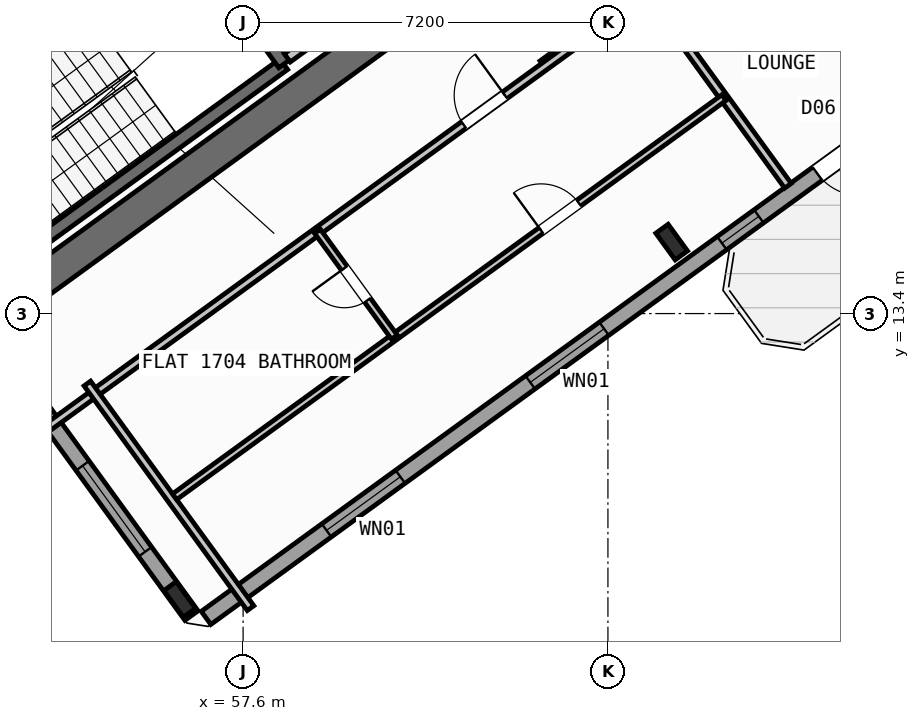
"""IFC4 building model, lengths in metres.
Left out: names, types, materials, properties, quantities, classifications, styles, units other than length and angle.
Written with IfcOpenShell. Run it as: python <this file> out.ifc"""

import sys

from ifc_helpers import new_model, si_unit, direction, frame, frame_2d, origin, origin_2d, place, context, subcontext, project, spatial, rectangle, i_section, extrude, source, transform, mapped, element, fill, save


model = new_model("IFC4")
c1 = context("Model", 3, precision=1e-05, world=origin(), true_north=direction((0.0, 1.0)))
c2 = subcontext(c1, "Body", "Model", "MODEL_VIEW")
j1 = project(units=[si_unit("LENGTHUNIT", "METRE"), si_unit("PLANEANGLEUNIT", "RADIAN")], contexts=[c1])
p1 = place(None, origin())
s1 = spatial("IfcSite", under=j1, at=p1, CompositionType="ELEMENT")
p2 = place(p1, origin())
s2 = spatial("IfcBuilding", under=s1, at=p2, CompositionType="ELEMENT")
p3 = place(p2, frame((0.0, 0.0, 67.2)))
s3 = spatial("IfcBuildingStorey", under=s2, at=p3, CompositionType="ELEMENT", Elevation=67.2)
p4 = place(p3, frame((52.318, 13.11, 0.0), z_axis=(0.0, 0.0, 1.0), x_axis=(0.809019445368, 0.587781878776, 0.0)))
e1 = element("IfcWall", 1, at=p4, inside=s3, PredefinedType="SHEAR", context=c2, shape_type="SweptSolid", body=[
    extrude(rectangle(XDim=12.44, YDim=0.65, at=frame_2d((6.22, 0.0))), origin(), (0.0, 0.0, 1.0), 4.22),
])
m1 = source(origin(), c2, "Body", "SweptSolid", [
    extrude(i_section(OverallWidth=0.3, OverallDepth=0.65, WebThickness=0.016, FlangeThickness=0.031, at=origin_2d()), origin(), (0.0, 0.0, 1.0), 4.5),
])
for number, where, z_axis, x_axis in (
    (2, (56.35, 7.758, 0.0), (0.0, 0.0, 1.0), (0.809, 0.588, 0.0)),
    (3, (66.058, 14.811, 0.0), (0.0, 0.0, 1.0), (0.809, 0.588, 0.0)),
):
    element("IfcColumn", number, at=place(p3, frame(where, z_axis=z_axis, x_axis=x_axis)), inside=s3, PredefinedType="COLUMN", context=c2, shape_type="MappedRepresentation", body=[
        mapped(m1, transform((0.0, 0.0, 0.0), scale=1.0)),
    ])
p5 = place(p3, frame((58.455, 35.484, 0.0), z_axis=(0.0, 0.0, 1.0), x_axis=(0.587783625747, -0.809018176127, 0.0)))
e4 = element("IfcWall", 4, at=p5, inside=s3, PredefinedType="STANDARD", context=c2, shape_type="SweptSolid", body=[
    extrude(rectangle(XDim=21.587, YDim=0.32, at=frame_2d((10.794, 0.0))), origin(), (0.0, 0.0, 1.0), 2.395),
])
p6 = place(p5, frame((2.194, 0.0, 1.0)))
e5 = element("IfcOpeningElement", 5, at=p6, cuts=e4, PredefinedType="OPENING", context=c2, shape_type="SweptSolid", body=[
    extrude(rectangle(XDim=0.9, YDim=1.25, at=frame_2d((0.45, 0.625))), frame((0.0, 0.17, 0.0), z_axis=(0.0, -1.0, 0.0), x_axis=(1.0, 0.0, 0.0)), (0.0, 0.0, 1.0), 0.34),
])
p7 = place(p5, frame((4.994, 0.0, 1.0)))
e6 = element("IfcOpeningElement", 6, at=p7, cuts=e4, PredefinedType="OPENING", context=c2, shape_type="SweptSolid", body=[
    extrude(rectangle(XDim=0.9, YDim=1.25, at=frame_2d((0.45, 0.625))), frame((0.0, 0.17, 0.0), z_axis=(0.0, -1.0, 0.0), x_axis=(1.0, 0.0, 0.0)), (0.0, 0.0, 1.0), 0.34),
])
p8 = place(p5, frame((12.384, 0.0, 1.0)))
e7 = element("IfcOpeningElement", 7, at=p8, cuts=e4, PredefinedType="OPENING", context=c2, shape_type="SweptSolid", body=[
    extrude(rectangle(XDim=0.9, YDim=1.25, at=frame_2d((0.45, 0.625))), frame((0.0, 0.17, 0.0), z_axis=(0.0, -1.0, 0.0), x_axis=(1.0, 0.0, 0.0)), (0.0, 0.0, 1.0), 0.34),
])
p9 = place(p5, frame((18.835, 0.0, 1.0)))
e8 = element("IfcOpeningElement", 8, at=p9, cuts=e4, PredefinedType="OPENING", context=c2, shape_type="SweptSolid", body=[
    extrude(rectangle(XDim=0.9, YDim=1.25, at=frame_2d((0.45, 0.625))), frame((0.0, 0.17, 0.0), z_axis=(0.0, -1.0, 0.0), x_axis=(1.0, 0.0, 0.0)), (0.0, 0.0, 1.0), 0.34),
])
p10 = place(p3, frame((71.098, 17.731, 0.0), z_axis=(0.0, 0.0, 1.0), x_axis=(-0.809021120468, -0.587779573171, 0.0)))
e9 = element("IfcWall", 9, at=p10, inside=s3, PredefinedType="STANDARD", context=c2, shape_type="SweptSolid", body=[
    extrude(rectangle(XDim=17.588, YDim=0.32, at=frame_2d((8.794, 0.0))), origin(), (0.0, 0.0, 1.0), 4.22),
])
p11 = place(p10, frame((1.624, 0.0, 0.0)))
e10 = element("IfcOpeningElement", 10, at=p11, cuts=e9, PredefinedType="OPENING", context=c2, shape_type="SweptSolid", body=[
    extrude(rectangle(XDim=1.05, YDim=2.15, at=frame_2d((0.525, 1.075))), frame((0.0, 0.17, 0.0), z_axis=(0.0, -1.0, 0.0), x_axis=(1.0, 0.0, 0.0)), (0.0, 0.0, 1.0), 0.34),
])
p12 = place(p10, frame((4.104, 0.0, 1.0)))
e11 = element("IfcOpeningElement", 11, at=p12, cuts=e9, PredefinedType="OPENING", context=c2, shape_type="SweptSolid", body=[
    extrude(rectangle(XDim=0.9, YDim=1.25, at=frame_2d((0.45, 0.625))), frame((0.0, 0.17, 0.0), z_axis=(0.0, -1.0, 0.0), x_axis=(1.0, 0.0, 0.0)), (0.0, 0.0, 1.0), 0.34),
])
p13 = place(p10, frame((7.879, 0.0, 0.85)))
e12 = element("IfcOpeningElement", 12, at=p13, cuts=e9, PredefinedType="OPENING", context=c2, shape_type="SweptSolid", body=[
    extrude(rectangle(XDim=1.8, YDim=1.5, at=frame_2d((0.9, 0.75))), frame((0.0, 0.17, 0.0), z_axis=(0.0, -1.0, 0.0), x_axis=(1.0, 0.0, 0.0)), (0.0, 0.0, 1.0), 0.34),
])
p14 = place(p10, frame((12.849, 0.0, 0.85)))
e13 = element("IfcOpeningElement", 13, at=p14, cuts=e9, PredefinedType="OPENING", context=c2, shape_type="SweptSolid", body=[
    extrude(rectangle(XDim=1.8, YDim=1.5, at=frame_2d((0.9, 0.75))), frame((0.0, 0.17, 0.0), z_axis=(0.0, -1.0, 0.0), x_axis=(1.0, 0.0, 0.0)), (0.0, 0.0, 1.0), 0.34),
])
p15 = place(p3, frame((56.581, 7.439, 0.0), z_axis=(0.0, 0.0, 1.0), x_axis=(-0.587785875463, 0.809016541614, 0.0)))
e14 = element("IfcWall", 14, at=p15, inside=s3, PredefinedType="STANDARD", context=c2, shape_type="SweptSolid", body=[
    extrude(rectangle(XDim=6.774, YDim=0.32, at=frame_2d((3.387, 0.0))), origin(), (0.0, 0.0, 1.0), 4.22),
])
p16 = place(p15, frame((1.556, 0.0, 0.8)))
e15 = element("IfcOpeningElement", 15, at=p16, cuts=e14, PredefinedType="OPENING", context=c2, shape_type="SweptSolid", body=[
    extrude(rectangle(XDim=2.1, YDim=1.55, at=frame_2d((1.05, 0.775))), frame((0.0, 0.17, 0.0), z_axis=(0.0, -1.0, 0.0), x_axis=(1.0, 0.0, 0.0)), (0.0, 0.0, 1.0), 0.34),
])
p17 = place(p3, frame((52.472, 14.013, 0.0), z_axis=(0.0, 0.0, 1.0), x_axis=(0.809028366311, 0.587769599847, 0.0)))
e16 = element("IfcWall", 16, at=p17, inside=s3, PredefinedType="SHEAR", context=c2, shape_type="SweptSolid", body=[
    extrude(rectangle(XDim=7.33, YDim=0.26, at=frame_2d((3.665, 0.0))), origin(), (0.0, 0.0, 1.0), 4.22),
])
p18 = place(p3, frame((50.615, 16.57, 0.0), z_axis=(0.0, 0.0, 1.0), x_axis=(0.809028366311, 0.587769599847, 0.0)))
e17 = element("IfcWall", 17, at=p18, inside=s3, PredefinedType="SHEAR", context=c2, shape_type="SweptSolid", body=[
    extrude(rectangle(XDim=7.33, YDim=0.26, at=frame_2d((3.665, 0.0))), origin(), (0.0, 0.0, 1.0), 4.22),
])
p19 = place(p18, frame((0.22, 0.0, 0.0)))
e18 = element("IfcOpeningElement", 18, at=p19, cuts=e17, PredefinedType="OPENING", context=c2, shape_type="SweptSolid", body=[
    extrude(rectangle(XDim=1.1, YDim=2.1, at=frame_2d((0.55, 1.05))), frame((0.0, 0.14, 0.0), z_axis=(0.0, -1.0, 0.0), x_axis=(1.0, 0.0, 0.0)), (0.0, 0.0, 1.0), 0.28),
])
p20 = place(p3, frame((58.41, 18.327, 0.0), z_axis=(0.0, 0.0, 1.0), x_axis=(-0.58776738483, 0.809029975545, 0.0)))
e19 = element("IfcWall", 19, at=p20, inside=s3, PredefinedType="SHEAR", context=c2, shape_type="SweptSolid", body=[
    extrude(rectangle(XDim=3.16, YDim=0.26, at=frame_2d((1.58, 0.0))), origin(), (0.0, 0.0, 1.0), 4.22),
])
p21 = place(p3, frame((58.472, 18.447, 0.0), z_axis=(0.0, 0.0, 1.0), x_axis=(0.809022487728, 0.587777691266, 0.0)))
e20 = element("IfcWall", 20, at=p21, inside=s3, PredefinedType="STANDARD", context=c2, shape_type="SweptSolid", body=[
    extrude(rectangle(XDim=3.648, YDim=0.2, at=frame_2d((1.824, 0.0))), origin(), (0.0, 0.0, 1.0), 4.21),
])
p22 = place(p3, frame((63.507, 18.322, 0.0), z_axis=(0.0, 0.0, 1.0), x_axis=(0.809034604122, 0.587761013791, 0.0)))
e21 = element("IfcWall", 21, at=p22, inside=s3, PredefinedType="PARTITIONING", context=c2, shape_type="SweptSolid", body=[
    extrude(rectangle(XDim=2.51, YDim=0.16, at=frame_2d((1.255, 0.0))), origin(), (0.0, 0.0, 1.0), 4.21),
])
p23 = place(p3, frame((68.353, 15.922, 0.0), z_axis=(0.0, 0.0, 1.0), x_axis=(-0.587783168305, 0.809018508476, 0.0)))
e22 = element("IfcWall", 22, at=p23, inside=s3, PredefinedType="PARTITIONING", context=c2, shape_type="SweptSolid", body=[
    extrude(rectangle(XDim=10.65, YDim=0.16, at=frame_2d((5.325, 0.0))), origin(), (0.0, 0.0, 1.0), 4.21),
])
p24 = place(p3, frame((53.705, 11.126, 0.0), z_axis=(0.0, 0.0, 1.0), x_axis=(0.809014504436, 0.587788679384, 0.0)))
e23 = element("IfcWall", 23, at=p24, inside=s3, PredefinedType="PARTITIONING", context=c2, shape_type="SweptSolid", body=[
    extrude(rectangle(XDim=14.67, YDim=0.16, at=frame_2d((7.335, 0.0))), origin(), (0.0, 0.0, 1.0), 4.21),
])
p25 = place(p24, frame((10.2, 0.0, 0.0)))
e24 = element("IfcOpeningElement", 24, at=p25, cuts=e23, PredefinedType="OPENING", context=c2, shape_type="SweptSolid", body=[
    extrude(rectangle(XDim=1.0, YDim=2.1, at=frame_2d((0.5, 1.05))), frame((0.0, 0.09, 0.0), z_axis=(0.0, -1.0, 0.0), x_axis=(1.0, 0.0, 0.0)), (0.0, 0.0, 1.0), 0.18),
])
p26 = place(p3, frame((57.747, 7.586, 0.0), z_axis=(0.0, 0.0, 1.0), x_axis=(-0.587784893399, 0.809017255126, 0.0)))
e25 = element("IfcWall", 25, at=p26, inside=s3, PredefinedType="PARTITIONING", context=c2, shape_type="SweptSolid", body=[
    extrude(rectangle(XDim=5.48, YDim=0.16, at=frame_2d((2.74, 0.0))), origin(), (0.0, 0.0, 1.0), 4.21),
])
p27 = place(p3, frame((56.249, 9.785, 0.0), z_axis=(0.0, 0.0, 1.0), x_axis=(0.809011747655, 0.587792473715, 0.0)))
e26 = element("IfcWall", 26, at=p27, inside=s3, PredefinedType="PLUMBINGWALL", context=c2, shape_type="SweptSolid", body=[
    extrude(rectangle(XDim=13.4, YDim=0.14, at=frame_2d((6.7, 0.0))), origin(), (0.0, 0.0, 1.0), 4.21),
])
p28 = place(p27, frame((8.94, 0.0, 0.0)))
e27 = element("IfcOpeningElement", 27, at=p28, cuts=e26, PredefinedType="OPENING", context=c2, shape_type="SweptSolid", body=[
    extrude(rectangle(XDim=0.92, YDim=2.08, at=frame_2d((0.46, 1.04))), frame((0.0, 0.08, 0.0), z_axis=(0.0, -1.0, 0.0), x_axis=(1.0, 0.0, 0.0)), (0.0, 0.0, 1.0), 0.16),
])
p29 = place(p3, frame((60.585, 12.936, 0.0), z_axis=(0.0, 0.0, 1.0), x_axis=(-0.587772116736, 0.809026537752, 0.0)))
e28 = element("IfcWall", 28, at=p29, inside=s3, PredefinedType="PLUMBINGWALL", context=c2, shape_type="SweptSolid", body=[
    extrude(rectangle(XDim=2.58, YDim=0.14, at=frame_2d((1.29, 0.0))), origin(), (0.0, 0.0, 1.0), 4.21),
])
p30 = place(p29, frame((0.9, 0.0, 0.0)))
e29 = element("IfcOpeningElement", 29, at=p30, cuts=e28, PredefinedType="OPENING", context=c2, shape_type="SweptSolid", body=[
    extrude(rectangle(XDim=0.78, YDim=2.05, at=frame_2d((0.39, 1.025))), frame((0.0, 0.08, 0.0), z_axis=(0.0, -1.0, 0.0), x_axis=(1.0, 0.0, 0.0)), (0.0, 0.0, 1.0), 0.16),
])
m2 = source(origin(), c2, "Body", "SweptSolid", [
    extrude(rectangle(XDim=1.05, YDim=2.15, at=frame_2d((0.525, 1.075))), frame((0.0, 0.025, 0.0), z_axis=(0.0, -1.0, 0.0), x_axis=(1.0, 0.0, 0.0)), (0.0, 0.0, 1.0), 0.05),
])
p31 = place(p11, origin())
e30 = element("IfcDoor", 30, at=p31, inside=s3, OperationType="SINGLE_SWING_LEFT", PredefinedType="DOOR", context=c2, shape_type="MappedRepresentation", body=[
    mapped(m2, transform((0.0, 0.0, 0.0), scale=1.0)),
])
fill(e10, e30)
m3 = source(origin(), c2, "Body", "SweptSolid", [
    extrude(rectangle(XDim=0.9, YDim=1.25, at=frame_2d((0.45, 0.625))), frame((0.0, 0.03, 0.0), z_axis=(0.0, -1.0, 0.0), x_axis=(1.0, 0.0, 0.0)), (0.0, 0.0, 1.0), 0.06),
])
p32 = place(p12, origin())
e31 = element("IfcWindow", 31, at=p32, inside=s3, PartitioningType="SINGLE_PANEL", PredefinedType="WINDOW", context=c2, shape_type="MappedRepresentation", body=[
    mapped(m3, transform((0.0, 0.0, 0.0), scale=1.0)),
])
fill(e11, e31)
m4 = source(origin(), c2, "Body", "SweptSolid", [
    extrude(rectangle(XDim=1.8, YDim=1.5, at=frame_2d((0.9, 0.75))), frame((0.0, 0.03, 0.0), z_axis=(0.0, -1.0, 0.0), x_axis=(1.0, 0.0, 0.0)), (0.0, 0.0, 1.0), 0.06),
])
p33 = place(p13, origin())
e32 = element("IfcWindow", 32, at=p33, inside=s3, PartitioningType="SINGLE_PANEL", PredefinedType="WINDOW", context=c2, shape_type="MappedRepresentation", body=[
    mapped(m4, transform((0.0, 0.0, 0.0), scale=1.0)),
])
fill(e12, e32)
p34 = place(p14, origin())
e33 = element("IfcWindow", 33, at=p34, inside=s3, PartitioningType="SINGLE_PANEL", PredefinedType="WINDOW", context=c2, shape_type="MappedRepresentation", body=[
    mapped(m4, transform((0.0, 0.0, 0.0), scale=1.0)),
])
fill(e13, e33)
m5 = source(origin(), c2, "Body", "SweptSolid", [
    extrude(rectangle(XDim=2.1, YDim=1.55, at=frame_2d((1.05, 0.775))), frame((0.0, 0.03, 0.0), z_axis=(0.0, -1.0, 0.0), x_axis=(1.0, 0.0, 0.0)), (0.0, 0.0, 1.0), 0.06),
])
p35 = place(p16, origin())
e34 = element("IfcWindow", 34, at=p35, inside=s3, PartitioningType="SINGLE_PANEL", PredefinedType="WINDOW", context=c2, shape_type="MappedRepresentation", body=[
    mapped(m5, transform((0.0, 0.0, 0.0), scale=1.0)),
])
fill(e15, e34)
m6 = source(origin(), c2, "Body", "SweptSolid", [
    extrude(rectangle(XDim=1.0, YDim=2.1, at=frame_2d((0.5, 1.05))), frame((0.0, 0.025, 0.0), z_axis=(0.0, -1.0, 0.0), x_axis=(1.0, 0.0, 0.0)), (0.0, 0.0, 1.0), 0.05),
])
p36 = place(p25, origin())
e35 = element("IfcDoor", 35, at=p36, inside=s3, OperationType="SINGLE_SWING_RIGHT", PredefinedType="DOOR", context=c2, shape_type="MappedRepresentation", body=[
    mapped(m6, transform((0.0, 0.0, 0.0), scale=1.0)),
])
fill(e24, e35)
m7 = source(origin(), c2, "Body", "SweptSolid", [
    extrude(rectangle(XDim=0.92, YDim=2.08, at=frame_2d((0.46, 1.04))), frame((0.0, 0.025, 0.0), z_axis=(0.0, -1.0, 0.0), x_axis=(1.0, 0.0, 0.0)), (0.0, 0.0, 1.0), 0.05),
])
p37 = place(p28, origin())
e36 = element("IfcDoor", 36, at=p37, inside=s3, OperationType="SINGLE_SWING_LEFT", PredefinedType="DOOR", context=c2, shape_type="MappedRepresentation", body=[
    mapped(m7, transform((0.0, 0.0, 0.0), scale=1.0)),
])
fill(e27, e36)
m8 = source(origin(), c2, "Body", "SweptSolid", [
    extrude(rectangle(XDim=0.78, YDim=2.05, at=frame_2d((0.39, 1.025))), frame((0.0, 0.025, 0.0), z_axis=(0.0, -1.0, 0.0), x_axis=(1.0, 0.0, 0.0)), (0.0, 0.0, 1.0), 0.05),
])
p38 = place(p30, origin())
e37 = element("IfcDoor", 37, at=p38, inside=s3, OperationType="SINGLE_SWING_RIGHT", PredefinedType="DOOR", context=c2, shape_type="MappedRepresentation", body=[
    mapped(m8, transform((0.0, 0.0, 0.0), scale=1.0)),
])
fill(e29, e37)
save(model, sys.argv[1])
